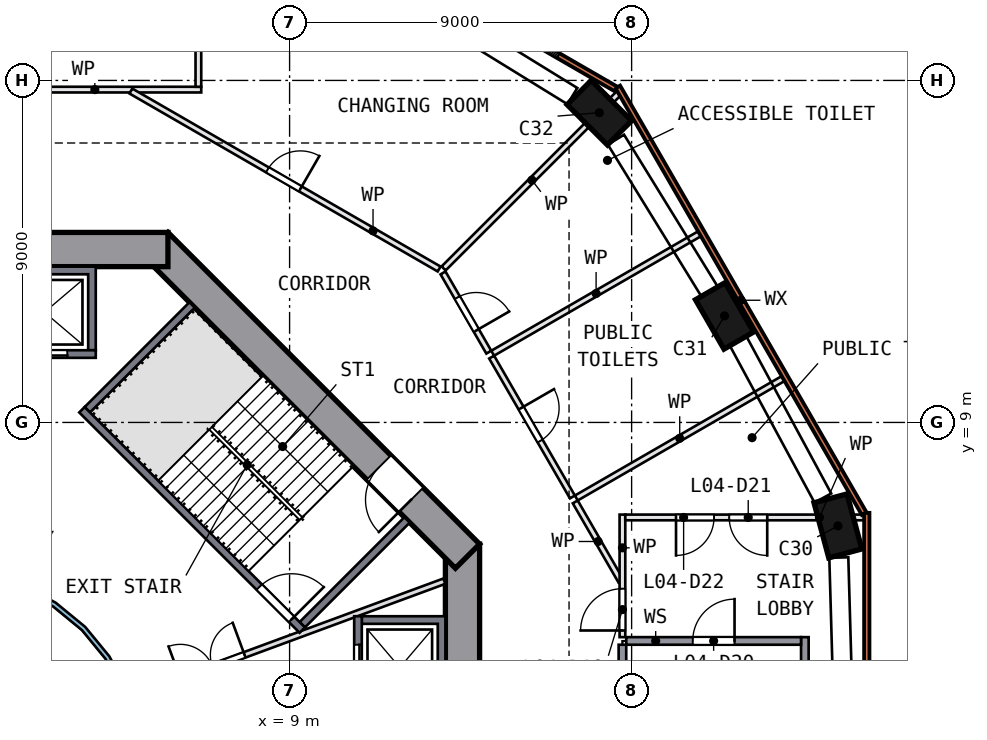
"""IFC4 building model, lengths in metres.
Left out: names, types, materials, properties, quantities, classifications, styles, units other than length and angle.
Written with IfcOpenShell. Run it as: python <this file> out.ifc"""

import sys

from ifc_helpers import new_model, si_unit, direction, frame, frame_2d, origin, origin_2d, place, context, subcontext, project, spatial, polyline, rectangle, outline, extrude, element, fill, save


model = new_model("IFC4")
c1 = context("Model", 3, precision=1e-05, world=origin(), true_north=direction((0.0, 1.0)))
c2 = subcontext(c1, "Body", "Model", "MODEL_VIEW")
j1 = project(units=[si_unit("LENGTHUNIT", "METRE"), si_unit("PLANEANGLEUNIT", "RADIAN")], contexts=[c1])
p1 = place(None, origin())
s1 = spatial("IfcSite", under=j1, at=p1, CompositionType="ELEMENT")
p2 = place(p1, origin())
s2 = spatial("IfcBuilding", under=s1, at=p2, CompositionType="ELEMENT")
p3 = place(p2, frame((0.0, 0.0, 23.5)))
s3 = spatial("IfcBuildingStorey", under=s2, at=p3, CompositionType="ELEMENT", Elevation=23.5)
for number, where, z_axis, x_axis in (
    (1, (23.428, 6.278, 0.0), (0.0, 0.0, 1.0), (0.259, -0.966, 0.0)),
    (2, (20.445, 11.804, 0.0), (0.0, 0.0, 1.0), (-0.5, 0.866, 0.0)),
    (3, (17.151, 17.151, 0.0), (0.0, 0.0, 1.0), (0.707, -0.707, 0.0)),
):
    element("IfcColumn", number, at=place(p3, frame(where, z_axis=z_axis, x_axis=x_axis)), inside=s3, PredefinedType="COLUMN", context=c2, shape_type="SweptSolid", body=[
        extrude(rectangle(XDim=1.5, YDim=0.9, at=origin_2d()), origin(), (0.0, 0.0, 1.0), 4.0),
    ])
p4 = place(p3, frame((13.55, -5.799, 0.0), z_axis=(0.0, 0.0, 1.0), x_axis=(0.0, 1.0, 0.0)))
e4 = element("IfcWall", 4, at=p4, inside=s3, PredefinedType="SHEAR", context=c2, shape_type="SweptSolid", body=[
    extrude(rectangle(XDim=11.598, YDim=0.9, at=frame_2d((5.799, 0.0))), origin(), (0.0, 0.0, 1.0), 4.5),
])
p5 = place(p4, frame((4.899, 0.0, 0.0)))
e5 = element("IfcOpeningElement", 5, at=p5, cuts=e4, PredefinedType="OPENING", context=c2, shape_type="SweptSolid", body=[
    extrude(rectangle(XDim=1.8, YDim=2.1, at=frame_2d((0.9, 1.05))), frame((0.0, 0.46, 0.0), z_axis=(0.0, -1.0, 0.0), x_axis=(1.0, 0.0, 0.0)), (0.0, 0.0, 1.0), 0.92),
])
p6 = place(p3, frame((13.682, 5.481, 0.0), z_axis=(0.0, 0.0, 1.0), x_axis=(-0.707106781, 0.707106781, 0.0)))
e6 = element("IfcWall", 6, at=p6, inside=s3, PredefinedType="SHEAR", context=c2, shape_type="SweptSolid", body=[
    extrude(rectangle(XDim=11.598, YDim=0.9, at=frame_2d((5.799, 0.0))), origin(), (0.0, 0.0, 1.0), 4.5),
])
p7 = place(p6, frame((2.099, 0.0, 0.0)))
e7 = element("IfcOpeningElement", 7, at=p7, cuts=e6, PredefinedType="OPENING", context=c2, shape_type="SweptSolid", body=[
    extrude(rectangle(XDim=1.2, YDim=2.1, at=frame_2d((0.6, 1.05))), frame((0.0, 0.46, 0.0), z_axis=(0.0, -1.0, 0.0), x_axis=(1.0, 0.0, 0.0)), (0.0, 0.0, 1.0), 0.92),
])
p8 = place(p3, frame((5.799, 13.55, 0.0), z_axis=(0.0, 0.0, 1.0), x_axis=(-1.0, 0.0, 0.0)))
e8 = element("IfcWall", 8, at=p8, inside=s3, PredefinedType="SHEAR", context=c2, shape_type="SweptSolid", body=[
    extrude(rectangle(XDim=11.598, YDim=0.9, at=frame_2d((5.799, 0.0))), origin(), (0.0, 0.0, 1.0), 4.5),
])
p9 = place(p8, frame((4.899, 0.0, 0.0)))
e9 = element("IfcOpeningElement", 9, at=p9, cuts=e8, PredefinedType="OPENING", context=c2, shape_type="SweptSolid", body=[
    extrude(rectangle(XDim=1.8, YDim=2.1, at=frame_2d((0.9, 1.05))), frame((0.0, 0.46, 0.0), z_axis=(0.0, -1.0, 0.0), x_axis=(1.0, 0.0, 0.0)), (0.0, 0.0, 1.0), 0.92),
])
p10 = place(p3, frame((24.188, -6.621, 0.0), z_axis=(0.0, 0.0, 1.0), x_axis=(0.0, 1.0, 0.0)))
e10 = element("IfcWall", 10, at=p10, inside=s3, PredefinedType="SOLIDWALL", context=c2, shape_type="SweptSolid", body=[
    extrude(rectangle(XDim=13.242, YDim=0.14, at=frame_2d((6.621, 0.0))), origin(), (0.0, 0.0, 1.0), 4.0),
])
p11 = place(p3, frame((24.118, 6.603, 0.0), z_axis=(0.0, 0.0, 1.0), x_axis=(-0.499997984, 0.866026568, 0.0)))
e11 = element("IfcWall", 11, at=p11, inside=s3, PredefinedType="SOLIDWALL", context=c2, shape_type="SweptSolid", body=[
    extrude(rectangle(XDim=12.962, YDim=0.14, at=frame_2d((6.481, 0.0))), origin(), (0.0, 0.0, 1.0), 4.0),
])
p12 = place(p3, frame((17.586, 17.777, 0.0), z_axis=(0.0, 0.0, 1.0), x_axis=(-0.866023287, 0.500003667, 0.0)))
e12 = element("IfcWall", 12, at=p12, inside=s3, PredefinedType="SOLIDWALL", context=c2, shape_type="SweptSolid", body=[
    extrude(rectangle(XDim=12.801, YDim=0.14, at=frame_2d((6.4, 0.0))), origin(), (0.0, 0.0, 1.0), 4.0),
])
p13 = place(p12, frame((1.748, 0.0, 0.9)))
e13 = element("IfcOpeningElement", 13, at=p13, cuts=e12, PredefinedType="OPENING", context=c2, shape_type="SweptSolid", body=[
    extrude(rectangle(XDim=3.0, YDim=2.4, at=frame_2d((1.5, 1.2))), frame((0.0, 0.08, 0.0), z_axis=(0.0, -1.0, 0.0), x_axis=(1.0, 0.0, 0.0)), (0.0, 0.0, 1.0), 0.16),
])
p14 = place(p12, frame((7.902, 0.0, 0.9)))
e14 = element("IfcOpeningElement", 14, at=p14, cuts=e12, PredefinedType="OPENING", context=c2, shape_type="SweptSolid", body=[
    extrude(rectangle(XDim=3.6, YDim=2.4, at=frame_2d((1.8, 1.2))), frame((0.0, 0.08, 0.0), z_axis=(0.0, -1.0, 0.0), x_axis=(1.0, 0.0, 0.0)), (0.0, 0.0, 1.0), 0.16),
])
p15 = place(p3, origin())
e15 = element("IfcWall", 15, at=p15, inside=s3, PredefinedType="SOLIDWALL", context=c2, shape_type="SweptSolid", body=[
    extrude(outline(polyline([(13.1, 3.9), (13.1, 1.2), (10.9, 1.2), (10.9, 1.4), (12.9, 1.4), (12.9, 3.7), (10.9, 3.7), (10.9, 3.9), (13.1, 3.9)])), origin(), (0.0, 0.0, 1.0), 4.0),
])
p16 = place(p3, frame((10.8, 1.2, 0.0), z_axis=(0.0, 0.0, 1.0), x_axis=(0.0, 1.0, 0.0)))
e16 = element("IfcWall", 16, at=p16, inside=s3, PredefinedType="SOLIDWALL", context=c2, shape_type="SweptSolid", body=[
    extrude(rectangle(XDim=2.7, YDim=0.2, at=frame_2d((1.35, 0.0))), origin(), (0.0, 0.0, 1.0), 4.0),
])
p17 = place(p16, frame((0.75, 0.0, 0.0)))
e17 = element("IfcOpeningElement", 17, at=p17, cuts=e16, PredefinedType="OPENING", context=c2, shape_type="SweptSolid", body=[
    extrude(rectangle(XDim=1.2, YDim=2.1, at=frame_2d((0.6, 1.05))), frame((0.0, 0.11, 0.0), z_axis=(0.0, -1.0, 0.0), x_axis=(1.0, 0.0, 0.0)), (0.0, 0.0, 1.0), 0.22),
])
p18 = place(p3, origin())
e18 = element("IfcWall", 18, at=p18, inside=s3, PredefinedType="SOLIDWALL", context=c2, shape_type="SweptSolid", body=[
    extrude(outline(polyline([(3.9, 13.1), (3.9, 10.9), (3.7, 10.9), (3.7, 12.9), (1.4, 12.9), (1.4, 10.9), (1.2, 10.9), (1.2, 13.1), (3.9, 13.1)])), origin(), (0.0, 0.0, 1.0), 4.0),
])
p19 = place(p3, frame((1.2, 10.8, 0.0), z_axis=(0.0, 0.0, 1.0), x_axis=(1.0, 0.0, 0.0)))
e19 = element("IfcWall", 19, at=p19, inside=s3, PredefinedType="SOLIDWALL", context=c2, shape_type="SweptSolid", body=[
    extrude(rectangle(XDim=2.7, YDim=0.2, at=frame_2d((1.35, 0.0))), origin(), (0.0, 0.0, 1.0), 4.0),
])
p20 = place(p19, frame((0.75, 0.0, 0.0)))
e20 = element("IfcOpeningElement", 20, at=p20, cuts=e19, PredefinedType="OPENING", context=c2, shape_type="SweptSolid", body=[
    extrude(rectangle(XDim=1.2, YDim=2.1, at=frame_2d((0.6, 1.05))), frame((0.0, 0.11, 0.0), z_axis=(0.0, -1.0, 0.0), x_axis=(1.0, 0.0, 0.0)), (0.0, 0.0, 1.0), 0.22),
])
p21 = place(p3, frame((3.535, 9.334, 0.0), z_axis=(0.0, 0.0, 1.0), x_axis=(0.707106781, -0.707106781, 0.0)))
e21 = element("IfcWall", 21, at=p21, inside=s3, PredefinedType="SOLIDWALL", context=c2, shape_type="SweptSolid", body=[
    extrude(rectangle(XDim=8.2, YDim=0.2, at=frame_2d((4.1, 0.0))), origin(), (0.0, 0.0, 1.0), 4.0),
])
p22 = place(p21, frame((6.6, 0.0, 0.0)))
e22 = element("IfcOpeningElement", 22, at=p22, cuts=e21, PredefinedType="OPENING", context=c2, shape_type="SweptSolid", body=[
    extrude(rectangle(XDim=1.2, YDim=2.1, at=frame_2d((0.6, 1.05))), frame((0.0, 0.11, 0.0), z_axis=(0.0, -1.0, 0.0), x_axis=(1.0, 0.0, 0.0)), (0.0, 0.0, 1.0), 0.22),
])
for number, where, z_axis, x_axis in (
    (23, (9.334, 3.677, 0.0), (0.0, 0.0, 1.0), (0.707, 0.707, 0.0)),
    (24, (3.677, 9.334, 0.0), (0.0, 0.0, 1.0), (0.707, 0.707, 0.0)),
):
    element("IfcWall", number, at=place(p3, frame(where, z_axis=z_axis, x_axis=x_axis)), inside=s3, PredefinedType="SOLIDWALL", context=c2, shape_type="SweptSolid", body=[
        extrude(rectangle(XDim=3.9, YDim=0.2, at=frame_2d((1.95, 0.0))), origin(), (0.0, 0.0, 1.0), 4.0),
    ])
p23 = place(p3, frame((4.813, 1.776, 0.0), z_axis=(0.0, 0.0, 1.0), x_axis=(0.93819293, 0.346112737, 0.0)))
e25 = element("IfcWall", 25, at=p23, inside=s3, PredefinedType="PARTITIONING", context=c2, shape_type="SweptSolid", body=[
    extrude(rectangle(XDim=8.803, YDim=0.15, at=frame_2d((4.402, 0.0))), origin(), (0.0, 0.0, 1.0), 4.0),
])
p24 = place(p23, frame((1.4, 0.0, 0.0)))
e26 = element("IfcOpeningElement", 26, at=p24, cuts=e25, PredefinedType="OPENING", context=c2, shape_type="SweptSolid", body=[
    extrude(rectangle(XDim=1.8, YDim=2.1, at=frame_2d((0.9, 1.05))), frame((0.0, 0.085, 0.0), z_axis=(0.0, -1.0, 0.0), x_axis=(1.0, 0.0, 0.0)), (0.0, 0.0, 1.0), 0.17),
])
p25 = place(p3, origin())
e27 = element("IfcWall", 27, at=p25, inside=s3, PredefinedType="SOLIDWALL", context=c2, shape_type="SweptSolid", body=[
    extrude(outline(polyline([(5.021, -0.999), (4.73, -1.959), (4.257, -2.844), (3.62, -3.62), (2.844, -4.257), (1.959, -4.73), (0.999, -5.021), (0.0, -5.12), (-0.999, -5.021), (-1.959, -4.73), (-2.844, -4.257), (-3.62, -3.62), (-4.257, -2.844), (-4.73, -1.959), (-5.021, -0.999), (-5.12, 0.0), (-5.021, 0.999), (-4.73, 1.959), (-4.257, 2.844), (-3.62, 3.62), (-2.844, 4.257), (-1.959, 4.73), (-0.999, 5.021), (0.0, 5.12), (0.999, 5.021), (1.959, 4.73), (2.844, 4.257), (3.62, 3.62), (4.257, 2.844), (4.73, 1.959), (5.021, 0.999), (5.12, 0.0), (5.021, -0.999)]), holes=[polyline([(4.904, 0.976), (4.619, 1.913), (4.157, 2.778), (3.535, 3.535), (2.778, 4.157), (1.913, 4.619), (0.976, 4.904), (0.0, 5.0), (-0.976, 4.904), (-1.913, 4.619), (-2.778, 4.157), (-3.535, 3.535), (-4.157, 2.778), (-4.619, 1.913), (-4.904, 0.976), (-5.0, 0.0), (-4.904, -0.976), (-4.619, -1.913), (-4.157, -2.778), (-3.535, -3.535), (-2.778, -4.157), (-1.913, -4.619), (-0.976, -4.904), (0.0, -5.0), (0.976, -4.904), (1.913, -4.619), (2.778, -4.157), (3.535, -3.535), (4.157, -2.778), (4.619, -1.913), (4.904, -0.976), (5.0, 0.0), (4.904, 0.976)])]), origin(), (0.0, 0.0, 1.0), 4.0),
])
p26 = place(p3, frame((6.675, 17.758, 0.0), z_axis=(0.0, 0.0, 1.0), x_axis=(-1.0, 0.0, 0.0)))
e28 = element("IfcWall", 28, at=p26, inside=s3, PredefinedType="PARTITIONING", context=c2, shape_type="SweptSolid", body=[
    extrude(rectangle(XDim=13.35, YDim=0.15, at=frame_2d((6.675, 0.0))), origin(), (0.0, 0.0, 1.0), 4.0),
])
p27 = place(p26, frame((5.8, 0.0, 0.0)))
e29 = element("IfcOpeningElement", 29, at=p27, cuts=e28, PredefinedType="OPENING", context=c2, shape_type="SweptSolid", body=[
    extrude(rectangle(XDim=1.8, YDim=2.1, at=frame_2d((0.9, 1.05))), frame((0.0, 0.085, 0.0), z_axis=(0.0, -1.0, 0.0), x_axis=(1.0, 0.0, 0.0)), (0.0, 0.0, 1.0), 0.17),
])
p28 = place(p3, frame((4.823, 17.721, 0.0), z_axis=(0.0, 0.0, 1.0), x_axis=(0.866037142, -0.499979668, 0.0)))
e30 = element("IfcWall", 30, at=p28, inside=s3, PredefinedType="PARTITIONING", context=c2, shape_type="SweptSolid", body=[
    extrude(rectangle(XDim=9.367, YDim=0.15, at=frame_2d((4.683, 0.0))), origin(), (0.0, 0.0, 1.0), 4.0),
])
p29 = place(p28, frame((4.15, 0.0, 0.0)))
e31 = element("IfcOpeningElement", 31, at=p29, cuts=e30, PredefinedType="OPENING", context=c2, shape_type="SweptSolid", body=[
    extrude(rectangle(XDim=1.0, YDim=2.1, at=frame_2d((0.5, 1.05))), frame((0.0, 0.085, 0.0), z_axis=(0.0, -1.0, 0.0), x_axis=(1.0, 0.0, 0.0)), (0.0, 0.0, 1.0), 0.17),
])
p30 = place(p3, frame((6.6, 17.833, 0.0), z_axis=(0.0, 0.0, 1.0), x_axis=(0.0, 1.0, 0.0)))
e32 = element("IfcWall", 32, at=p30, inside=s3, PredefinedType="PARTITIONING", context=c2, shape_type="SweptSolid", body=[
    extrude(rectangle(XDim=5.582, YDim=0.15, at=frame_2d((2.791, 0.0))), origin(), (0.0, 0.0, 1.0), 4.0),
])
p31 = place(p3, frame((13.038, 12.935, 0.0), z_axis=(0.0, 0.0, 1.0), x_axis=(0.499933044, -0.866064057, 0.0)))
e33 = element("IfcWall", 33, at=p31, inside=s3, PredefinedType="PARTITIONING", context=c2, shape_type="SweptSolid", body=[
    extrude(rectangle(XDim=2.408, YDim=0.15, at=frame_2d((1.204, 0.0))), origin(), (0.0, 0.0, 1.0), 4.0),
])
p32 = place(p31, frame((0.75, 0.0, 0.0)))
e34 = element("IfcOpeningElement", 34, at=p32, cuts=e33, PredefinedType="OPENING", context=c2, shape_type="SweptSolid", body=[
    extrude(rectangle(XDim=1.0, YDim=2.1, at=frame_2d((0.5, 1.05))), frame((0.0, 0.085, 0.0), z_axis=(0.0, -1.0, 0.0), x_axis=(1.0, 0.0, 0.0)), (0.0, 0.0, 1.0), 0.17),
])
p33 = place(p3, frame((14.317, 10.719, 0.0), z_axis=(0.0, 0.0, 1.0), x_axis=(0.500037366, -0.866003829, 0.0)))
e35 = element("IfcWall", 35, at=p33, inside=s3, PredefinedType="PARTITIONING", context=c2, shape_type="SweptSolid", body=[
    extrude(rectangle(XDim=4.25, YDim=0.15, at=frame_2d((2.125, 0.0))), origin(), (0.0, 0.0, 1.0), 4.0),
])
p34 = place(p33, frame((1.55, 0.0, 0.0)))
e36 = element("IfcOpeningElement", 36, at=p34, cuts=e35, PredefinedType="OPENING", context=c2, shape_type="SweptSolid", body=[
    extrude(rectangle(XDim=1.0, YDim=2.1, at=frame_2d((0.5, 1.05))), frame((0.0, 0.085, 0.0), z_axis=(0.0, -1.0, 0.0), x_axis=(1.0, 0.0, 0.0)), (0.0, 0.0, 1.0), 0.17),
])
p35 = place(p3, frame((16.517, 6.909, 0.0), z_axis=(0.0, 0.0, 1.0), x_axis=(0.499933044, -0.866064057, 0.0)))
e37 = element("IfcWall", 37, at=p35, inside=s3, PredefinedType="PARTITIONING", context=c2, shape_type="SweptSolid", body=[
    extrude(rectangle(XDim=2.408, YDim=0.15, at=frame_2d((1.204, 0.0))), origin(), (0.0, 0.0, 1.0), 4.0),
])
p36 = place(p3, frame((17.758, 3.15, 0.0), z_axis=(0.0, 0.0, 1.0), x_axis=(0.0, -1.0, 0.0)))
e38 = element("IfcWall", 38, at=p36, inside=s3, PredefinedType="SOLIDWALL", context=c2, shape_type="SweptSolid", body=[
    extrude(rectangle(XDim=9.3, YDim=0.2, at=frame_2d((4.65, 0.0))), origin(), (0.0, 0.0, 1.0), 4.0),
])
p37 = place(p3, frame((17.758, 3.35, 0.0), z_axis=(0.0, 0.0, 1.0), x_axis=(0.0, 1.0, 0.0)))
e39 = element("IfcWall", 39, at=p37, inside=s3, PredefinedType="PARTITIONING", context=c2, shape_type="SweptSolid", body=[
    extrude(rectangle(XDim=3.225, YDim=0.15, at=frame_2d((1.613, 0.0))), origin(), (0.0, 0.0, 1.0), 4.0),
])
p38 = place(p37, frame((0.175, 0.0, 0.0)))
e40 = element("IfcOpeningElement", 40, at=p38, cuts=e39, PredefinedType="OPENING", context=c2, shape_type="SweptSolid", body=[
    extrude(rectangle(XDim=1.1, YDim=2.1, at=frame_2d((0.55, 1.05))), frame((0.0, 0.085, 0.0), z_axis=(0.0, -1.0, 0.0), x_axis=(1.0, 0.0, 0.0)), (0.0, 0.0, 1.0), 0.17),
])
p39 = place(p3, frame((17.7, 17.7, 0.0), z_axis=(0.0, 0.0, 1.0), x_axis=(-0.707106781, -0.707106781, 0.0)))
e41 = element("IfcWall", 41, at=p39, inside=s3, PredefinedType="PARTITIONING", context=c2, shape_type="SweptSolid", body=[
    extrude(rectangle(XDim=6.572, YDim=0.15, at=frame_2d((3.286, 0.0))), origin(), (0.0, 0.0, 1.0), 4.0),
])
p40 = place(p3, frame((19.787, 13.964, 0.0), z_axis=(0.0, 0.0, 1.0), x_axis=(-0.866042631, -0.49997016, 0.0)))
e42 = element("IfcWall", 42, at=p40, inside=s3, PredefinedType="PARTITIONING", context=c2, shape_type="SweptSolid", body=[
    extrude(rectangle(XDim=6.285, YDim=0.15, at=frame_2d((3.143, 0.0))), origin(), (0.0, 0.0, 1.0), 4.0),
])
p41 = place(p3, frame((21.987, 10.154, 0.0), z_axis=(0.0, 0.0, 1.0), x_axis=(-0.866032921, -0.49998698, 0.0)))
e43 = element("IfcWall", 43, at=p41, inside=s3, PredefinedType="PARTITIONING", context=c2, shape_type="SweptSolid", body=[
    extrude(rectangle(XDim=6.285, YDim=0.15, at=frame_2d((3.143, 0.0))), origin(), (0.0, 0.0, 1.0), 4.0),
])
p42 = place(p3, frame((22.558, -6.15, 0.0), z_axis=(0.0, 0.0, 1.0), x_axis=(0.0, 1.0, 0.0)))
e44 = element("IfcWall", 44, at=p42, inside=s3, PredefinedType="SOLIDWALL", context=c2, shape_type="SweptSolid", body=[
    extrude(rectangle(XDim=9.5, YDim=0.2, at=frame_2d((4.75, 0.0))), origin(), (0.0, 0.0, 1.0), 4.0),
])
p43 = place(p3, frame((17.858, 3.25, 0.0), z_axis=(0.0, 0.0, 1.0), x_axis=(1.0, 0.0, 0.0)))
e45 = element("IfcWall", 45, at=p43, inside=s3, PredefinedType="SOLIDWALL", context=c2, shape_type="SweptSolid", body=[
    extrude(rectangle(XDim=4.6, YDim=0.2, at=frame_2d((2.3, 0.0))), origin(), (0.0, 0.0, 1.0), 4.0),
])
p44 = place(p43, frame((1.75, 0.0, 0.0)))
e46 = element("IfcOpeningElement", 46, at=p44, cuts=e45, PredefinedType="OPENING", context=c2, shape_type="SweptSolid", body=[
    extrude(rectangle(XDim=1.1, YDim=2.1, at=frame_2d((0.55, 1.05))), frame((0.0, 0.11, 0.0), z_axis=(0.0, -1.0, 0.0), x_axis=(1.0, 0.0, 0.0)), (0.0, 0.0, 1.0), 0.22),
])
p45 = place(p3, frame((24.118, 6.5, 0.0), z_axis=(0.0, 0.0, 1.0), x_axis=(-1.0, 0.0, 0.0)))
e47 = element("IfcWall", 47, at=p45, inside=s3, PredefinedType="PARTITIONING", context=c2, shape_type="SweptSolid", body=[
    extrude(rectangle(XDim=6.285, YDim=0.15, at=frame_2d((3.143, 0.0))), origin(), (0.0, 0.0, 1.0), 4.0),
])
p46 = place(p45, frame((2.55, 0.0, 0.0)))
e48 = element("IfcOpeningElement", 48, at=p46, cuts=e47, PredefinedType="OPENING", context=c2, shape_type="SweptSolid", body=[
    extrude(rectangle(XDim=1.0, YDim=2.1, at=frame_2d((0.5, 1.05))), frame((0.0, 0.085, 0.0), z_axis=(0.0, -1.0, 0.0), x_axis=(1.0, 0.0, 0.0)), (0.0, 0.0, 1.0), 0.17),
])
p47 = place(p45, frame((3.95, 0.0, 0.0)))
e49 = element("IfcOpeningElement", 49, at=p47, cuts=e47, PredefinedType="OPENING", context=c2, shape_type="SweptSolid", body=[
    extrude(rectangle(XDim=1.0, YDim=2.1, at=frame_2d((0.5, 1.05))), frame((0.0, 0.085, 0.0), z_axis=(0.0, -1.0, 0.0), x_axis=(1.0, 0.0, 0.0)), (0.0, 0.0, 1.0), 0.17),
])
p48 = place(p13, origin())
e50 = element("IfcWindow", 50, at=p48, inside=s3, PartitioningType="SINGLE_PANEL", PredefinedType="WINDOW", context=c2, shape_type="SweptSolid", body=[
    extrude(rectangle(XDim=3.0, YDim=2.4, at=frame_2d((1.5, 1.2))), frame((0.0, 0.03, 0.0), z_axis=(0.0, -1.0, 0.0), x_axis=(1.0, 0.0, 0.0)), (0.0, 0.0, 1.0), 0.06),
])
fill(e13, e50)
p49 = place(p17, origin())
e51 = element("IfcDoor", 51, at=p49, inside=s3, OperationType="DOUBLE_DOOR_SLIDING", PredefinedType="DOOR", context=c2, shape_type="SweptSolid", body=[
    extrude(rectangle(XDim=1.2, YDim=2.1, at=frame_2d((0.6, 1.05))), frame((0.0, 0.025, 0.0), z_axis=(0.0, -1.0, 0.0), x_axis=(1.0, 0.0, 0.0)), (0.0, 0.0, 1.0), 0.05),
])
fill(e17, e51)
p50 = place(p20, origin())
e52 = element("IfcDoor", 52, at=p50, inside=s3, OperationType="DOUBLE_DOOR_SLIDING", PredefinedType="DOOR", context=c2, shape_type="SweptSolid", body=[
    extrude(rectangle(XDim=1.2, YDim=2.1, at=frame_2d((0.6, 1.05))), frame((0.0, 0.025, 0.0), z_axis=(0.0, -1.0, 0.0), x_axis=(1.0, 0.0, 0.0)), (0.0, 0.0, 1.0), 0.05),
])
fill(e20, e52)
p51 = place(p22, origin())
e53 = element("IfcDoor", 53, at=p51, inside=s3, OperationType="SINGLE_SWING_RIGHT", PredefinedType="DOOR", context=c2, shape_type="SweptSolid", body=[
    extrude(rectangle(XDim=1.2, YDim=2.1, at=frame_2d((0.6, 1.05))), frame((0.0, 0.025, 0.0), z_axis=(0.0, -1.0, 0.0), x_axis=(1.0, 0.0, 0.0)), (0.0, 0.0, 1.0), 0.05),
])
fill(e22, e53)
p52 = place(p7, origin())
e54 = element("IfcDoor", 54, at=p52, inside=s3, OperationType="SINGLE_SWING_LEFT", PredefinedType="DOOR", context=c2, shape_type="SweptSolid", body=[
    extrude(rectangle(XDim=1.2, YDim=2.1, at=frame_2d((0.6, 1.05))), frame((0.0, 0.025, 0.0), z_axis=(0.0, -1.0, 0.0), x_axis=(1.0, 0.0, 0.0)), (0.0, 0.0, 1.0), 0.05),
])
fill(e7, e54)
p53 = place(p24, origin())
e55 = element("IfcDoor", 55, at=p53, inside=s3, OperationType="DOUBLE_DOOR_SINGLE_SWING", PredefinedType="DOOR", context=c2, shape_type="SweptSolid", body=[
    extrude(rectangle(XDim=1.8, YDim=2.1, at=frame_2d((0.9, 1.05))), frame((0.0, 0.025, 0.0), z_axis=(0.0, -1.0, 0.0), x_axis=(1.0, 0.0, 0.0)), (0.0, 0.0, 1.0), 0.05),
])
fill(e26, e55)
p54 = place(p29, origin())
e56 = element("IfcDoor", 56, at=p54, inside=s3, OperationType="SINGLE_SWING_RIGHT", PredefinedType="DOOR", context=c2, shape_type="SweptSolid", body=[
    extrude(rectangle(XDim=1.0, YDim=2.1, at=frame_2d((0.5, 1.05))), frame((0.0, 0.025, 0.0), z_axis=(0.0, -1.0, 0.0), x_axis=(1.0, 0.0, 0.0)), (0.0, 0.0, 1.0), 0.05),
])
fill(e31, e56)
p55 = place(p32, origin())
e57 = element("IfcDoor", 57, at=p55, inside=s3, OperationType="SINGLE_SWING_RIGHT", PredefinedType="DOOR", context=c2, shape_type="SweptSolid", body=[
    extrude(rectangle(XDim=1.0, YDim=2.1, at=frame_2d((0.5, 1.05))), frame((0.0, 0.025, 0.0), z_axis=(0.0, -1.0, 0.0), x_axis=(1.0, 0.0, 0.0)), (0.0, 0.0, 1.0), 0.05),
])
fill(e34, e57)
p56 = place(p34, origin())
e58 = element("IfcDoor", 58, at=p56, inside=s3, OperationType="SINGLE_SWING_LEFT", PredefinedType="DOOR", context=c2, shape_type="SweptSolid", body=[
    extrude(rectangle(XDim=1.0, YDim=2.1, at=frame_2d((0.5, 1.05))), frame((0.0, 0.025, 0.0), z_axis=(0.0, -1.0, 0.0), x_axis=(1.0, 0.0, 0.0)), (0.0, 0.0, 1.0), 0.05),
])
fill(e36, e58)
p57 = place(p38, origin())
e59 = element("IfcDoor", 59, at=p57, inside=s3, OperationType="SINGLE_SWING_LEFT", PredefinedType="DOOR", context=c2, shape_type="SweptSolid", body=[
    extrude(rectangle(XDim=1.1, YDim=2.1, at=frame_2d((0.55, 1.05))), frame((0.0, 0.025, 0.0), z_axis=(0.0, -1.0, 0.0), x_axis=(1.0, 0.0, 0.0)), (0.0, 0.0, 1.0), 0.05),
])
fill(e40, e59)
p58 = place(p44, origin())
e60 = element("IfcDoor", 60, at=p58, inside=s3, OperationType="SINGLE_SWING_RIGHT", PredefinedType="DOOR", context=c2, shape_type="SweptSolid", body=[
    extrude(rectangle(XDim=1.1, YDim=2.1, at=frame_2d((0.55, 1.05))), frame((0.0, 0.025, 0.0), z_axis=(0.0, -1.0, 0.0), x_axis=(1.0, 0.0, 0.0)), (0.0, 0.0, 1.0), 0.05),
])
fill(e46, e60)
p59 = place(p46, origin())
e61 = element("IfcDoor", 61, at=p59, inside=s3, OperationType="SINGLE_SWING_LEFT", PredefinedType="DOOR", context=c2, shape_type="SweptSolid", body=[
    extrude(rectangle(XDim=1.0, YDim=2.1, at=frame_2d((0.5, 1.05))), frame((0.0, 0.025, 0.0), z_axis=(0.0, -1.0, 0.0), x_axis=(1.0, 0.0, 0.0)), (0.0, 0.0, 1.0), 0.05),
])
fill(e48, e61)
p60 = place(p47, origin())
e62 = element("IfcDoor", 62, at=p60, inside=s3, OperationType="SINGLE_SWING_RIGHT", PredefinedType="DOOR", context=c2, shape_type="SweptSolid", body=[
    extrude(rectangle(XDim=1.0, YDim=2.1, at=frame_2d((0.5, 1.05))), frame((0.0, 0.025, 0.0), z_axis=(0.0, -1.0, 0.0), x_axis=(1.0, 0.0, 0.0)), (0.0, 0.0, 1.0), 0.05),
])
fill(e49, e62)
save(model, sys.argv[1])
